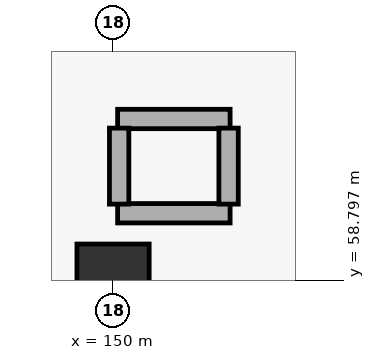
"""IFC4 building model, lengths in metres.
Left out: names, types, materials, properties, quantities, classifications, styles, units other than length and angle.
Written with IfcOpenShell. Run it as: python <this file> out.ifc"""

import sys

from ifc_helpers import new_model, si_unit, direction, frame, frame_2d, origin, origin_2d, place, context, subcontext, project, spatial, rectangle, extrude, element, save


model = new_model("IFC4")
c1 = context("Model", 3, precision=1e-05, world=origin(), true_north=direction((0.0, 1.0)))
c2 = subcontext(c1, "Body", "Model", "MODEL_VIEW")
j1 = project(units=[si_unit("LENGTHUNIT", "METRE"), si_unit("PLANEANGLEUNIT", "RADIAN")], contexts=[c1])
p1 = place(None, origin())
s1 = spatial("IfcSite", under=j1, at=p1, CompositionType="ELEMENT")
p2 = place(p1, origin())
s2 = spatial("IfcBuilding", under=s1, at=p2, CompositionType="ELEMENT")
p3 = place(p2, frame((0.0, 0.0, -4.8)))
s3 = spatial("IfcBuildingStorey", under=s2, at=p3, CompositionType="ELEMENT", Elevation=-4.8)
p4 = place(p3, frame((150.0, 58.8, 0.0), z_axis=(0.0, 0.0, 1.0), x_axis=(1.0, 0.0, 0.0)))
e1 = element("IfcColumn", 1, at=p4, inside=s3, PredefinedType="COLUMN", context=c2, shape_type="SweptSolid", body=[
    extrude(rectangle(XDim=0.95, YDim=0.95, at=origin_2d()), origin(), (0.0, 0.0, 1.0), 4.8),
])
for number, where, z_axis, x_axis in (
    (2, (150.06, 60.92, 0.0), (0.0, 0.0, 1.0), (1.0, 0.0, 0.0)),
    (3, (150.06, 59.68, 0.0), (0.0, 0.0, 1.0), (1.0, 0.0, 0.0)),
):
    element("IfcWall", number, at=place(p3, frame(where, z_axis=z_axis, x_axis=x_axis)), inside=s3, PredefinedType="PARTITIONING", context=c2, shape_type="SweptSolid", body=[
        extrude(rectangle(XDim=1.48, YDim=0.255, at=frame_2d((0.74, 0.0))), origin(), (0.0, 0.0, 1.0), 3.465),
    ])
p5 = place(p3, frame((150.08, 59.8, 0.0), z_axis=(0.0, 0.0, 1.0), x_axis=(0.0, 1.0, 0.0)))
e4 = element("IfcWall", 4, at=p5, inside=s3, PredefinedType="PARTITIONING", context=c2, shape_type="SweptSolid", body=[
    extrude(rectangle(XDim=1.0, YDim=0.255, at=frame_2d((0.5, 0.0))), origin(), (0.0, 0.0, 1.0), 3.465),
])
p6 = place(p3, frame((151.52, 59.8, 0.0), z_axis=(0.0, 0.0, 1.0), x_axis=(0.0, 1.0, 0.0)))
e5 = element("IfcWall", 5, at=p6, inside=s3, PredefinedType="PARTITIONING", context=c2, shape_type="SweptSolid", body=[
    extrude(rectangle(XDim=1.0, YDim=0.255, at=frame_2d((0.5, 0.0))), origin(), (0.0, 0.0, 1.0), 4.36),
])
save(model, sys.argv[1])
